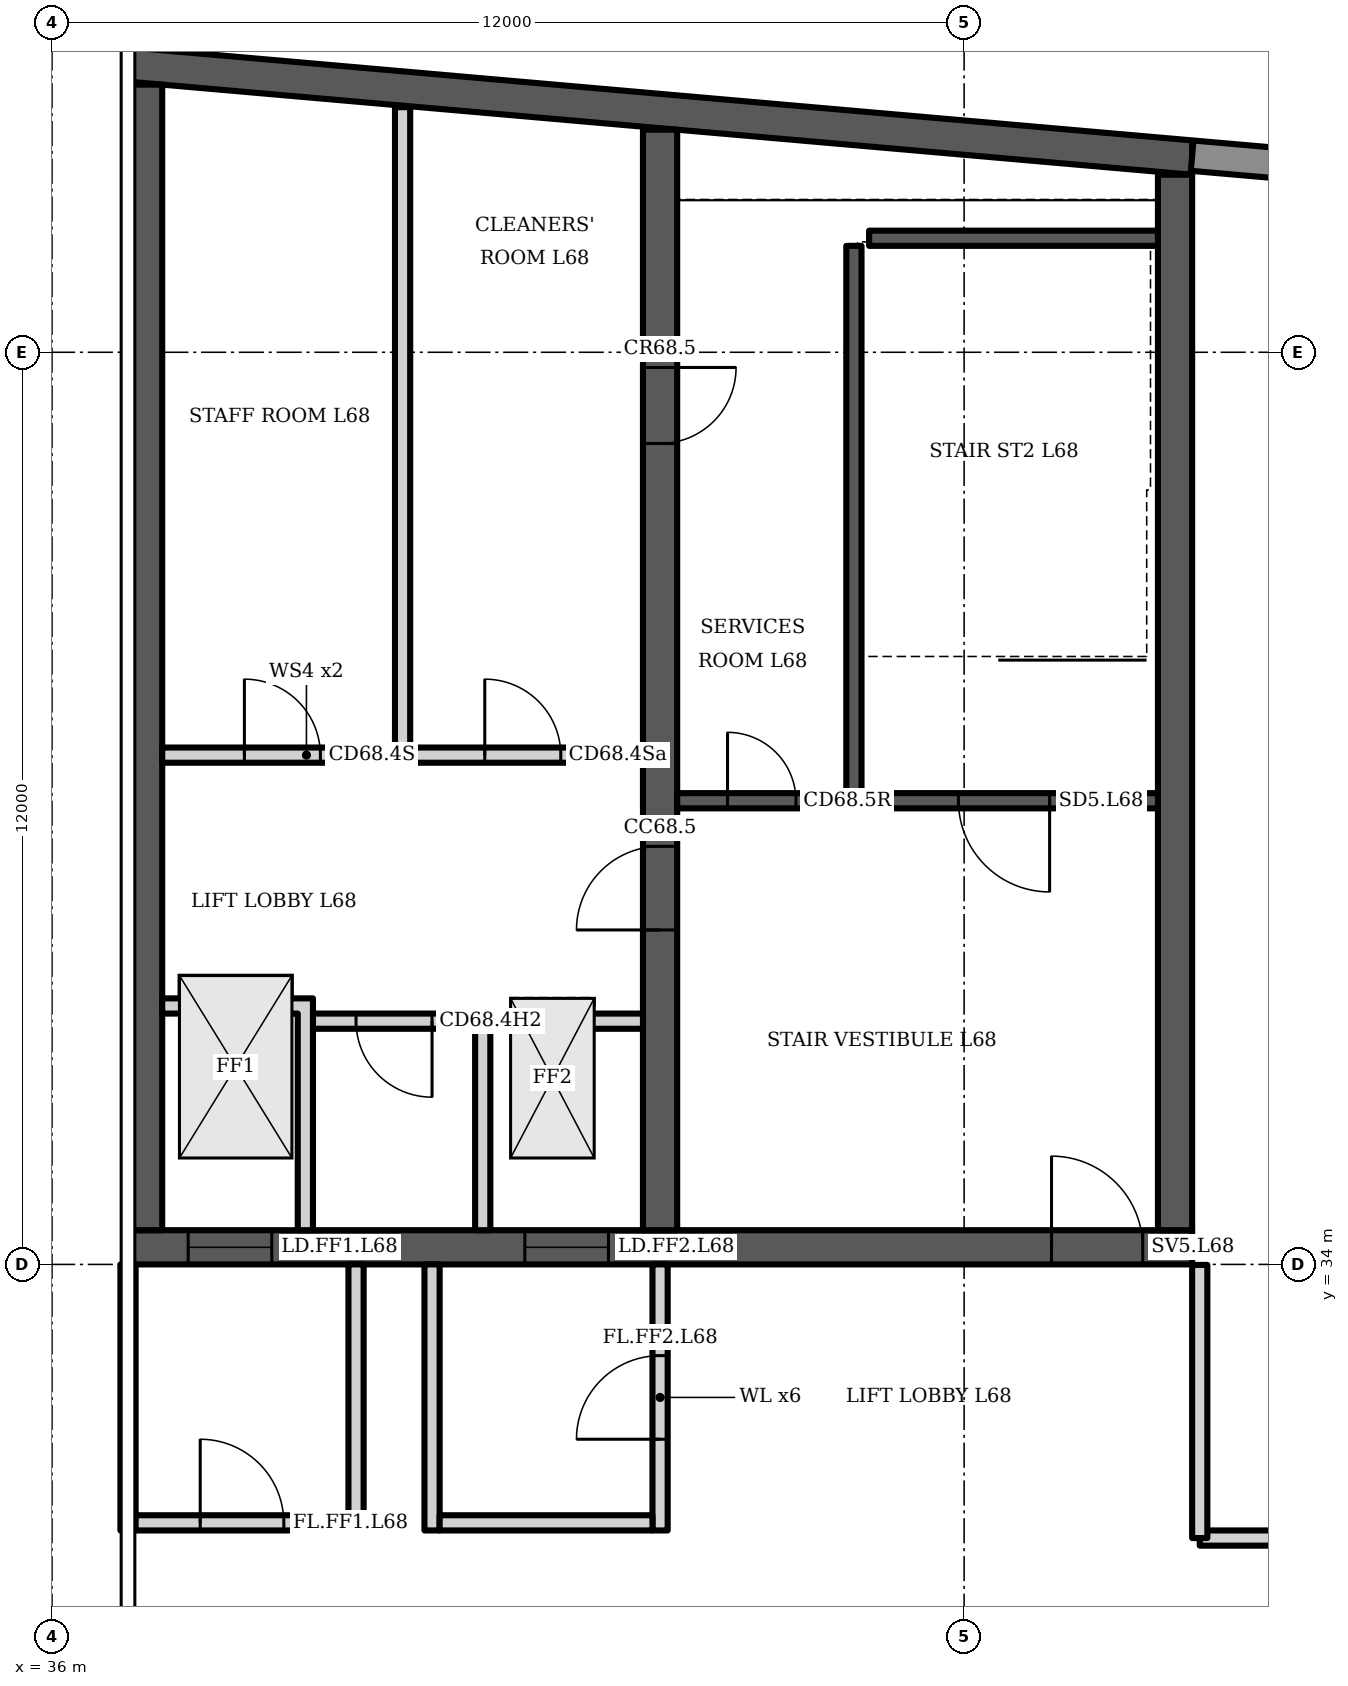
"""IFC4 building model, lengths in metres.
Left out: names, types, materials, properties, quantities, classifications, styles, units other than length and angle.
Written with IfcOpenShell. Run it as: python <this file> out.ifc"""

import sys

from ifc_helpers import new_model, si_unit, direction, frame, frame_2d, origin, place, context, subcontext, project, spatial, polyline, rectangle, outline, extrude, element, fill, save


model = new_model("IFC4")
c1 = context("Model", 3, precision=1e-05, world=origin(), true_north=direction((0.0, 1.0)))
c2 = subcontext(c1, "Body", "Model", "MODEL_VIEW")
j1 = project(units=[si_unit("LENGTHUNIT", "METRE"), si_unit("PLANEANGLEUNIT", "RADIAN")], contexts=[c1])
p1 = place(None, origin())
s1 = spatial("IfcSite", under=j1, at=p1, CompositionType="ELEMENT")
p2 = place(p1, origin())
s2 = spatial("IfcBuilding", under=s1, at=p2, CompositionType="ELEMENT")
p3 = place(p2, frame((0.0, 0.0, 267.5)))
s3 = spatial("IfcBuildingStorey", under=s2, at=p3, CompositionType="ELEMENT", Elevation=267.5)
p4 = place(p3, frame((0.0, 0.0, -0.0)))
e1 = element("IfcWall", 1, at=p4, inside=s3, PredefinedType="SHEAR", context=c2, shape_type="SweptSolid", body=[
    extrude(outline(polyline([(37.0, 49.561), (51.0, 48.336), (51.0, 48.787), (37.0, 50.012), (37.0, 49.561)])), origin(), (0.0, 0.0, 1.0), 1.622),
])
p5 = place(p3, frame((37.0, 34.225, 0.0), z_axis=(0.0, 0.0, 1.0), x_axis=(1.0, 0.0, 0.0)))
e2 = element("IfcWall", 2, at=p5, inside=s3, PredefinedType="SHEAR", context=c2, shape_type="SweptSolid", body=[
    extrude(outline(polyline([(0.0, 0.0), (14.0, 0.0), (14.0, 3.2), (12.25, 3.2), (10.5, 3.2), (8.75, 3.2), (7.0, 3.2), (5.25, 3.2), (3.5, 3.036), (1.75, 2.329), (0.0, 2.25), (0.0, 0.0)])), frame((0.0, 0.225, 0.0), z_axis=(0.0, -1.0, 0.0), x_axis=(1.0, 0.0, 0.0)), (0.0, 0.0, 1.0), 0.45),
])
p6 = place(p5, frame((0.792, 0.0, 0.0)))
e3 = element("IfcOpeningElement", 3, at=p6, cuts=e2, PredefinedType="OPENING", context=c2, shape_type="SweptSolid", body=[
    extrude(rectangle(XDim=1.1, YDim=2.1, at=frame_2d((0.55, 1.05))), frame((0.0, 0.235, 0.0), z_axis=(0.0, -1.0, 0.0), x_axis=(1.0, 0.0, 0.0)), (0.0, 0.0, 1.0), 0.47),
])
p7 = place(p5, frame((5.221, 0.0, 0.0)))
e4 = element("IfcOpeningElement", 4, at=p7, cuts=e2, PredefinedType="OPENING", context=c2, shape_type="SweptSolid", body=[
    extrude(rectangle(XDim=1.1, YDim=2.1, at=frame_2d((0.55, 1.05))), frame((0.0, 0.235, 0.0), z_axis=(0.0, -1.0, 0.0), x_axis=(1.0, 0.0, 0.0)), (0.0, 0.0, 1.0), 0.47),
])
p8 = place(p5, frame((12.15, 0.0, 0.0)))
e5 = element("IfcOpeningElement", 5, at=p8, cuts=e2, PredefinedType="OPENING", context=c2, shape_type="SweptSolid", body=[
    extrude(rectangle(XDim=1.2, YDim=2.1, at=frame_2d((0.6, 1.05))), frame((0.0, 0.235, 0.0), z_axis=(0.0, -1.0, 0.0), x_axis=(1.0, 0.0, 0.0)), (0.0, 0.0, 1.0), 0.47),
])
p9 = place(p3, frame((37.225, 34.45, 0.0), z_axis=(0.0, 0.0, 1.0), x_axis=(0.0, 1.0, 0.0)))
e6 = element("IfcWall", 6, at=p9, inside=s3, PredefinedType="SHEAR", context=c2, shape_type="SweptSolid", body=[
    extrude(rectangle(XDim=15.071, YDim=0.45, at=frame_2d((7.536, 0.0))), origin(), (0.0, 0.0, 1.0), 1.713),
])
p10 = place(p3, frame((44.0, 34.45, 0.0), z_axis=(0.0, 0.0, 1.0), x_axis=(0.0, 1.0, 0.0)))
e7 = element("IfcWall", 7, at=p10, inside=s3, PredefinedType="SHEAR", context=c2, shape_type="SweptSolid", body=[
    extrude(rectangle(XDim=14.479, YDim=0.45, at=frame_2d((7.239, 0.0))), origin(), (0.0, 0.0, 1.0), 4.45),
])
p11 = place(p10, frame((3.95, 0.0, 0.0)))
e8 = element("IfcOpeningElement", 8, at=p11, cuts=e7, PredefinedType="OPENING", context=c2, shape_type="SweptSolid", body=[
    extrude(rectangle(XDim=1.1, YDim=2.1, at=frame_2d((0.55, 1.05))), frame((0.0, 0.235, 0.0), z_axis=(0.0, -1.0, 0.0), x_axis=(1.0, 0.0, 0.0)), (0.0, 0.0, 1.0), 0.47),
])
p12 = place(p10, frame((10.35, 0.0, 0.0)))
e9 = element("IfcOpeningElement", 9, at=p12, cuts=e7, PredefinedType="OPENING", context=c2, shape_type="SweptSolid", body=[
    extrude(rectangle(XDim=1.0, YDim=2.1, at=frame_2d((0.5, 1.05))), frame((0.0, 0.235, 0.0), z_axis=(0.0, -1.0, 0.0), x_axis=(1.0, 0.0, 0.0)), (0.0, 0.0, 1.0), 0.47),
])
p13 = place(p3, frame((50.775, 34.45, 0.0), z_axis=(0.0, 0.0, 1.0), x_axis=(0.0, 1.0, 0.0)))
e10 = element("IfcWall", 10, at=p13, inside=s3, PredefinedType="SHEAR", context=c2, shape_type="SweptSolid", body=[
    extrude(rectangle(XDim=13.886, YDim=0.45, at=frame_2d((6.943, 0.0))), origin(), (0.0, 0.0, 1.0), 3.2),
])
p14 = place(p3, frame((53.983, 48.326, 0.0), z_axis=(0.0, 0.0, 1.0), x_axis=(-0.996194, 0.087168, 0.0)))
e11 = element("IfcWall", 11, at=p14, inside=s3, PredefinedType="SOLIDWALL", context=c2, shape_type="SweptSolid", body=[
    extrude(rectangle(XDim=2.994, YDim=0.4, at=frame_2d((1.497, 0.0))), origin(), (0.0, 0.0, 1.0), 2.8),
])
p15 = place(p3, frame((39.433, 37.2, 0.0), z_axis=(0.0, 0.0, 1.0), x_axis=(1.0, 0.0, 0.0)))
e12 = element("IfcWall", 12, at=p15, inside=s3, PredefinedType="PARTITIONING", context=c2, shape_type="SweptSolid", body=[
    extrude(rectangle(XDim=2.133, YDim=0.2, at=frame_2d((1.067, 0.0))), origin(), (0.0, 0.0, 1.0), 2.8),
])
p16 = place(p15, frame((0.567, 0.0, 0.0)))
e13 = element("IfcOpeningElement", 13, at=p16, cuts=e12, PredefinedType="OPENING", context=c2, shape_type="SweptSolid", body=[
    extrude(rectangle(XDim=1.0, YDim=2.1, at=frame_2d((0.5, 1.05))), frame((0.0, 0.11, 0.0), z_axis=(0.0, -1.0, 0.0), x_axis=(1.0, 0.0, 0.0)), (0.0, 0.0, 1.0), 0.22),
])
p17 = place(p3, frame((37.45, 40.7, 0.0), z_axis=(0.0, 0.0, 1.0), x_axis=(1.0, 0.0, 0.0)))
e14 = element("IfcWall", 14, at=p17, inside=s3, PredefinedType="PARTITIONING", context=c2, shape_type="SweptSolid", body=[
    extrude(rectangle(XDim=6.325, YDim=0.2, at=frame_2d((3.163, 0.0))), origin(), (0.0, 0.0, 1.0), 2.8),
])
p18 = place(p17, frame((1.081, 0.0, 0.0)))
e15 = element("IfcOpeningElement", 15, at=p18, cuts=e14, PredefinedType="OPENING", context=c2, shape_type="SweptSolid", body=[
    extrude(rectangle(XDim=1.0, YDim=2.1, at=frame_2d((0.5, 1.05))), frame((0.0, 0.11, 0.0), z_axis=(0.0, -1.0, 0.0), x_axis=(1.0, 0.0, 0.0)), (0.0, 0.0, 1.0), 0.22),
])
p19 = place(p17, frame((4.244, 0.0, 0.0)))
e16 = element("IfcOpeningElement", 16, at=p19, cuts=e14, PredefinedType="OPENING", context=c2, shape_type="SweptSolid", body=[
    extrude(rectangle(XDim=1.0, YDim=2.1, at=frame_2d((0.5, 1.05))), frame((0.0, 0.11, 0.0), z_axis=(0.0, -1.0, 0.0), x_axis=(1.0, 0.0, 0.0)), (0.0, 0.0, 1.0), 0.22),
])
p20 = place(p3, origin())
e17 = element("IfcWall", 17, at=p20, inside=s3, PredefinedType="PARTITIONING", context=c2, shape_type="SweptSolid", body=[
    extrude(outline(polyline([(41.567, 37.3), (41.767, 37.3), (43.775, 37.3), (43.775, 37.1), (41.767, 37.1), (41.767, 34.45), (41.567, 34.45), (41.567, 37.3)])), origin(), (0.0, 0.0, 1.0), 2.8),
])
p21 = place(p3, origin())
e18 = element("IfcWall", 18, at=p21, inside=s3, PredefinedType="PARTITIONING", context=c2, shape_type="SweptSolid", body=[
    extrude(outline(polyline([(39.233, 37.3), (37.45, 37.3), (37.45, 37.5), (39.233, 37.5), (39.433, 37.5), (39.433, 34.45), (39.233, 34.45), (39.233, 37.3)])), origin(), (0.0, 0.0, 1.0), 2.8),
])
p22 = place(p3, frame((40.613, 40.8, 0.0), z_axis=(0.0, 0.0, 1.0), x_axis=(0.0, 1.0, 0.0)))
e19 = element("IfcWall", 19, at=p22, inside=s3, PredefinedType="PARTITIONING", context=c2, shape_type="SweptSolid", body=[
    extrude(rectangle(XDim=8.425, YDim=0.2, at=frame_2d((4.212, 0.0))), origin(), (0.0, 0.0, 1.0), 2.8),
])
p23 = place(p3, frame((44.225, 40.1, 0.0), z_axis=(0.0, 0.0, 1.0), x_axis=(1.0, 0.0, 0.0)))
e20 = element("IfcWall", 20, at=p23, inside=s3, PredefinedType="SHEAR", context=c2, shape_type="SweptSolid", body=[
    extrude(rectangle(XDim=6.325, YDim=0.2, at=frame_2d((3.163, 0.0))), origin(), (0.0, 0.0, 1.0), 2.8),
])
p24 = place(p23, frame((3.7, 0.0, 0.0)))
e21 = element("IfcOpeningElement", 21, at=p24, cuts=e20, PredefinedType="OPENING", context=c2, shape_type="SweptSolid", body=[
    extrude(rectangle(XDim=1.2, YDim=2.1, at=frame_2d((0.6, 1.05))), frame((0.0, 0.11, 0.0), z_axis=(0.0, -1.0, 0.0), x_axis=(1.0, 0.0, 0.0)), (0.0, 0.0, 1.0), 0.22),
])
p25 = place(p23, frame((0.663, 0.0, 0.0)))
e22 = element("IfcOpeningElement", 22, at=p25, cuts=e20, PredefinedType="OPENING", context=c2, shape_type="SweptSolid", body=[
    extrude(rectangle(XDim=0.9, YDim=2.1, at=frame_2d((0.45, 1.05))), frame((0.0, 0.11, 0.0), z_axis=(0.0, -1.0, 0.0), x_axis=(1.0, 0.0, 0.0)), (0.0, 0.0, 1.0), 0.22),
])
p26 = place(p3, frame((46.55, 40.2, 0.0), z_axis=(0.0, 0.0, 1.0), x_axis=(0.0, 1.0, 0.0)))
e23 = element("IfcWall", 23, at=p26, inside=s3, PredefinedType="SHEAR", context=c2, shape_type="SweptSolid", body=[
    extrude(rectangle(XDim=7.2, YDim=0.2, at=frame_2d((3.6, 0.0))), origin(), (0.0, 0.0, 1.0), 2.8),
])
p27 = place(p3, frame((46.75, 47.5, 0.0), z_axis=(0.0, 0.0, 1.0), x_axis=(1.0, 0.0, 0.0)))
e24 = element("IfcWall", 24, at=p27, inside=s3, PredefinedType="SHEAR", context=c2, shape_type="SweptSolid", body=[
    extrude(rectangle(XDim=3.8, YDim=0.2, at=frame_2d((1.9, 0.0))), origin(), (0.0, 0.0, 1.0), 2.8),
])
p28 = place(p3, frame((64.2, 30.4, 0.0), z_axis=(0.0, 0.0, 1.0), x_axis=(-1.0, 0.0, 0.0)))
e25 = element("IfcWall", 25, at=p28, inside=s3, PredefinedType="PARTITIONING", context=c2, shape_type="SweptSolid", body=[
    extrude(rectangle(XDim=13.1, YDim=0.2, at=frame_2d((6.55, 0.0))), origin(), (0.0, 0.0, 1.0), 2.8),
])
p29 = place(p28, frame((6.4, 0.0, 0.0)))
e26 = element("IfcOpeningElement", 26, at=p29, cuts=e25, PredefinedType="OPENING", context=c2, shape_type="SweptSolid", body=[
    extrude(rectangle(XDim=1.0, YDim=2.1, at=frame_2d((0.5, 1.05))), frame((0.0, 0.11, 0.0), z_axis=(0.0, -1.0, 0.0), x_axis=(1.0, 0.0, 0.0)), (0.0, 0.0, 1.0), 0.22),
])
p30 = place(p3, frame((51.1, 30.4, 0.0), z_axis=(0.0, 0.0, 1.0), x_axis=(0.0, 1.0, 0.0)))
e27 = element("IfcWall", 27, at=p30, inside=s3, PredefinedType="PARTITIONING", context=c2, shape_type="SweptSolid", body=[
    extrude(rectangle(XDim=3.594, YDim=0.2, at=frame_2d((1.797, 0.0))), origin(), (0.0, 0.0, 1.0), 2.8),
])
p31 = place(p3, frame((37.0, 30.5, 0.0), z_axis=(0.0, 0.0, 1.0), x_axis=(0.0, 1.0, 0.0)))
e28 = element("IfcWall", 28, at=p31, inside=s3, PredefinedType="PARTITIONING", context=c2, shape_type="SweptSolid", body=[
    extrude(rectangle(XDim=3.5, YDim=0.2, at=frame_2d((1.75, 0.0))), origin(), (0.0, 0.0, 1.0), 1.602),
])
p32 = place(p3, frame((40.0, 30.5, 0.0), z_axis=(0.0, 0.0, 1.0), x_axis=(0.0, 1.0, 0.0)))
e29 = element("IfcWall", 29, at=p32, inside=s3, PredefinedType="PARTITIONING", context=c2, shape_type="SweptSolid", body=[
    extrude(rectangle(XDim=3.5, YDim=0.2, at=frame_2d((1.75, 0.0))), origin(), (0.0, 0.0, 1.0), 2.8),
])
p33 = place(p3, frame((37.1, 30.6, 0.0), z_axis=(0.0, 0.0, 1.0), x_axis=(1.0, 0.0, 0.0)))
e30 = element("IfcWall", 30, at=p33, inside=s3, PredefinedType="PARTITIONING", context=c2, shape_type="SweptSolid", body=[
    extrude(rectangle(XDim=2.8, YDim=0.2, at=frame_2d((1.4, 0.0))), origin(), (0.0, 0.0, 1.0), 2.8),
])
p34 = place(p33, frame((0.85, 0.0, 0.0)))
e31 = element("IfcOpeningElement", 31, at=p34, cuts=e30, PredefinedType="OPENING", context=c2, shape_type="SweptSolid", body=[
    extrude(rectangle(XDim=1.1, YDim=2.1, at=frame_2d((0.55, 1.05))), frame((0.0, 0.11, 0.0), z_axis=(0.0, -1.0, 0.0), x_axis=(1.0, 0.0, 0.0)), (0.0, 0.0, 1.0), 0.22),
])
p35 = place(p3, frame((41.0, 30.5, 0.0), z_axis=(0.0, 0.0, 1.0), x_axis=(0.0, 1.0, 0.0)))
e32 = element("IfcWall", 32, at=p35, inside=s3, PredefinedType="PARTITIONING", context=c2, shape_type="SweptSolid", body=[
    extrude(rectangle(XDim=3.5, YDim=0.2, at=frame_2d((1.75, 0.0))), origin(), (0.0, 0.0, 1.0), 2.8),
])
p36 = place(p3, frame((44.0, 30.5, 0.0), z_axis=(0.0, 0.0, 1.0), x_axis=(0.0, 1.0, 0.0)))
e33 = element("IfcWall", 33, at=p36, inside=s3, PredefinedType="PARTITIONING", context=c2, shape_type="SweptSolid", body=[
    extrude(rectangle(XDim=3.5, YDim=0.2, at=frame_2d((1.75, 0.0))), origin(), (0.0, 0.0, 1.0), 2.8),
])
p37 = place(p36, frame((1.2, 0.0, 0.0)))
e34 = element("IfcOpeningElement", 34, at=p37, cuts=e33, PredefinedType="OPENING", context=c2, shape_type="SweptSolid", body=[
    extrude(rectangle(XDim=1.1, YDim=2.1, at=frame_2d((0.55, 1.05))), frame((0.0, 0.11, 0.0), z_axis=(0.0, -1.0, 0.0), x_axis=(1.0, 0.0, 0.0)), (0.0, 0.0, 1.0), 0.22),
])
p38 = place(p3, frame((41.1, 30.6, 0.0), z_axis=(0.0, 0.0, 1.0), x_axis=(1.0, 0.0, 0.0)))
e35 = element("IfcWall", 35, at=p38, inside=s3, PredefinedType="PARTITIONING", context=c2, shape_type="SweptSolid", body=[
    extrude(rectangle(XDim=2.8, YDim=0.2, at=frame_2d((1.4, 0.0))), origin(), (0.0, 0.0, 1.0), 2.8),
])
p39 = place(p16, origin())
e36 = element("IfcDoor", 36, at=p39, inside=s3, OperationType="SINGLE_SWING_RIGHT", PredefinedType="DOOR", context=c2, shape_type="SweptSolid", body=[
    extrude(rectangle(XDim=1.0, YDim=2.1, at=frame_2d((0.5, 1.05))), frame((0.0, 0.025, 0.0), z_axis=(0.0, -1.0, 0.0), x_axis=(1.0, 0.0, 0.0)), (0.0, 0.0, 1.0), 0.05),
])
fill(e13, e36)
p40 = place(p6, origin())
e37 = element("IfcDoor", 37, at=p40, inside=s3, OperationType="DOUBLE_DOOR_SLIDING", PredefinedType="DOOR", context=c2, shape_type="SweptSolid", body=[
    extrude(rectangle(XDim=1.1, YDim=2.1, at=frame_2d((0.55, 1.05))), frame((0.0, 0.025, 0.0), z_axis=(0.0, -1.0, 0.0), x_axis=(1.0, 0.0, 0.0)), (0.0, 0.0, 1.0), 0.05),
])
fill(e3, e37)
p41 = place(p7, origin())
e38 = element("IfcDoor", 38, at=p41, inside=s3, OperationType="DOUBLE_DOOR_SLIDING", PredefinedType="DOOR", context=c2, shape_type="SweptSolid", body=[
    extrude(rectangle(XDim=1.1, YDim=2.1, at=frame_2d((0.55, 1.05))), frame((0.0, 0.025, 0.0), z_axis=(0.0, -1.0, 0.0), x_axis=(1.0, 0.0, 0.0)), (0.0, 0.0, 1.0), 0.05),
])
fill(e4, e38)
p42 = place(p18, origin())
e39 = element("IfcDoor", 39, at=p42, inside=s3, OperationType="SINGLE_SWING_LEFT", PredefinedType="DOOR", context=c2, shape_type="SweptSolid", body=[
    extrude(rectangle(XDim=1.0, YDim=2.1, at=frame_2d((0.5, 1.05))), frame((0.0, 0.025, 0.0), z_axis=(0.0, -1.0, 0.0), x_axis=(1.0, 0.0, 0.0)), (0.0, 0.0, 1.0), 0.05),
])
fill(e15, e39)
p43 = place(p19, origin())
e40 = element("IfcDoor", 40, at=p43, inside=s3, OperationType="SINGLE_SWING_LEFT", PredefinedType="DOOR", context=c2, shape_type="SweptSolid", body=[
    extrude(rectangle(XDim=1.0, YDim=2.1, at=frame_2d((0.5, 1.05))), frame((0.0, 0.025, 0.0), z_axis=(0.0, -1.0, 0.0), x_axis=(1.0, 0.0, 0.0)), (0.0, 0.0, 1.0), 0.05),
])
fill(e16, e40)
p44 = place(p24, origin())
e41 = element("IfcDoor", 41, at=p44, inside=s3, OperationType="SINGLE_SWING_RIGHT", PredefinedType="DOOR", context=c2, shape_type="SweptSolid", body=[
    extrude(rectangle(XDim=1.2, YDim=2.1, at=frame_2d((0.6, 1.05))), frame((0.0, 0.025, 0.0), z_axis=(0.0, -1.0, 0.0), x_axis=(1.0, 0.0, 0.0)), (0.0, 0.0, 1.0), 0.05),
])
fill(e21, e41)
p45 = place(p25, origin())
e42 = element("IfcDoor", 42, at=p45, inside=s3, OperationType="SINGLE_SWING_LEFT", PredefinedType="DOOR", context=c2, shape_type="SweptSolid", body=[
    extrude(rectangle(XDim=0.9, YDim=2.1, at=frame_2d((0.45, 1.05))), frame((0.0, 0.025, 0.0), z_axis=(0.0, -1.0, 0.0), x_axis=(1.0, 0.0, 0.0)), (0.0, 0.0, 1.0), 0.05),
])
fill(e22, e42)
p46 = place(p8, origin())
e43 = element("IfcDoor", 43, at=p46, inside=s3, OperationType="SINGLE_SWING_LEFT", PredefinedType="DOOR", context=c2, shape_type="SweptSolid", body=[
    extrude(rectangle(XDim=1.2, YDim=2.1, at=frame_2d((0.6, 1.05))), frame((0.0, 0.025, 0.0), z_axis=(0.0, -1.0, 0.0), x_axis=(1.0, 0.0, 0.0)), (0.0, 0.0, 1.0), 0.05),
])
fill(e5, e43)
p47 = place(p11, origin())
e44 = element("IfcDoor", 44, at=p47, inside=s3, OperationType="SINGLE_SWING_LEFT", PredefinedType="DOOR", context=c2, shape_type="SweptSolid", body=[
    extrude(rectangle(XDim=1.1, YDim=2.1, at=frame_2d((0.55, 1.05))), frame((0.0, 0.025, 0.0), z_axis=(0.0, -1.0, 0.0), x_axis=(1.0, 0.0, 0.0)), (0.0, 0.0, 1.0), 0.05),
])
fill(e8, e44)
p48 = place(p12, origin())
e45 = element("IfcDoor", 45, at=p48, inside=s3, OperationType="SINGLE_SWING_RIGHT", PredefinedType="DOOR", context=c2, shape_type="SweptSolid", body=[
    extrude(rectangle(XDim=1.0, YDim=2.1, at=frame_2d((0.5, 1.05))), frame((0.0, 0.025, 0.0), z_axis=(0.0, -1.0, 0.0), x_axis=(1.0, 0.0, 0.0)), (0.0, 0.0, 1.0), 0.05),
])
fill(e9, e45)
p49 = place(p34, origin())
e46 = element("IfcDoor", 46, at=p49, inside=s3, OperationType="SINGLE_SWING_LEFT", PredefinedType="DOOR", context=c2, shape_type="SweptSolid", body=[
    extrude(rectangle(XDim=1.1, YDim=2.1, at=frame_2d((0.55, 1.05))), frame((0.0, 0.025, 0.0), z_axis=(0.0, -1.0, 0.0), x_axis=(1.0, 0.0, 0.0)), (0.0, 0.0, 1.0), 0.05),
])
fill(e31, e46)
p50 = place(p37, origin())
e47 = element("IfcDoor", 47, at=p50, inside=s3, OperationType="SINGLE_SWING_LEFT", PredefinedType="DOOR", context=c2, shape_type="SweptSolid", body=[
    extrude(rectangle(XDim=1.1, YDim=2.1, at=frame_2d((0.55, 1.05))), frame((0.0, 0.025, 0.0), z_axis=(0.0, -1.0, 0.0), x_axis=(1.0, 0.0, 0.0)), (0.0, 0.0, 1.0), 0.05),
])
fill(e34, e47)
save(model, sys.argv[1])
